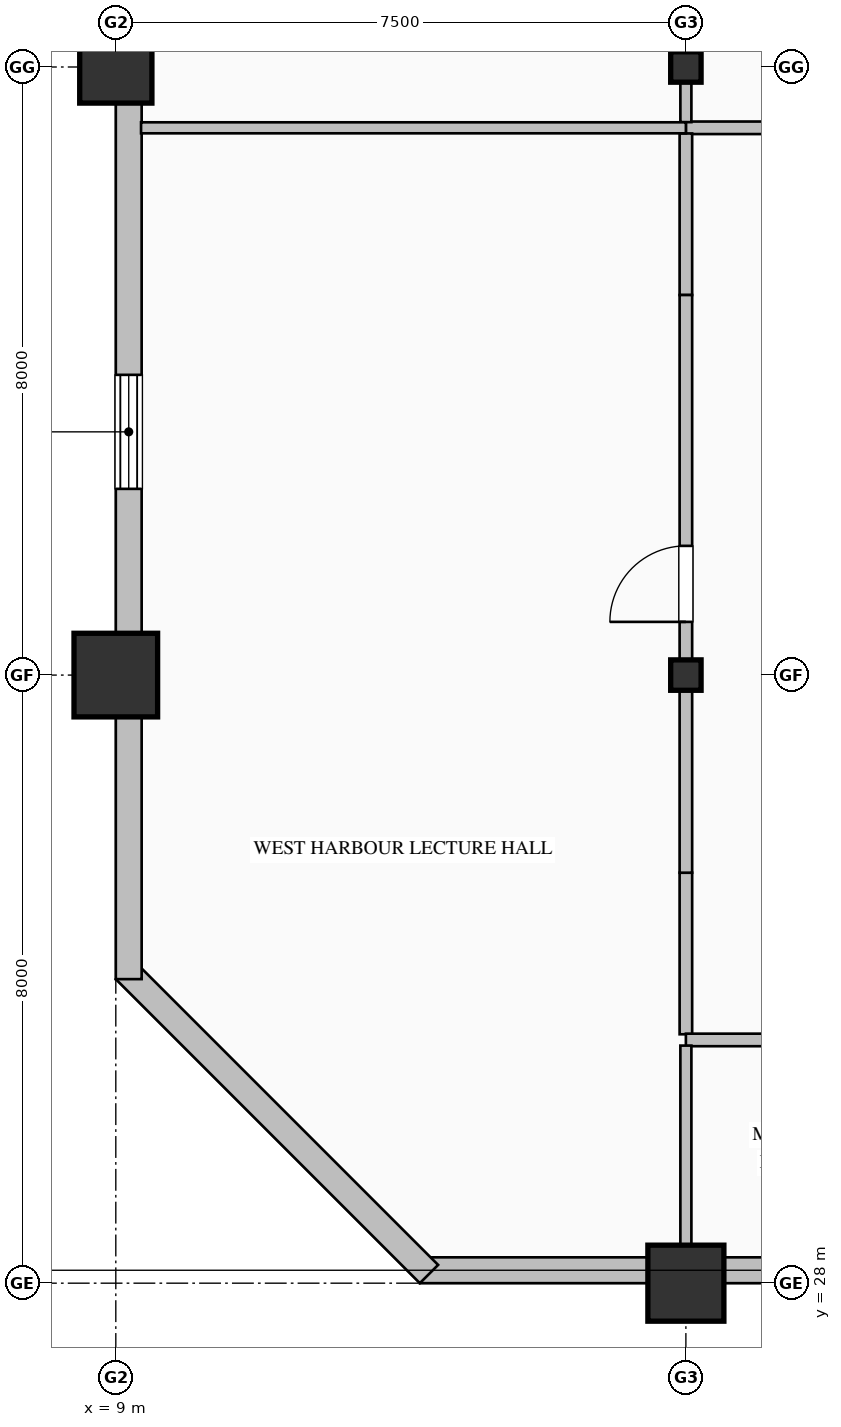
"""IFC4 building model, lengths in metres.
Left out: names, types, materials, properties, quantities, classifications, styles, units other than length and angle.
Written with IfcOpenShell. Run it as: python <this file> out.ifc"""

import sys

from ifc_helpers import new_model, si_unit, direction, frame, frame_2d, origin, origin_2d, place, context, subcontext, project, spatial, rectangle, hollow_rectangle, hollow_circle, i_section, extrude, element, fill, save


model = new_model("IFC4")
c1 = context("Model", 3, precision=1e-05, world=origin(), true_north=direction((0.0, 1.0)))
c2 = subcontext(c1, "Body", "Model", "MODEL_VIEW")
j1 = project(units=[si_unit("LENGTHUNIT", "METRE"), si_unit("PLANEANGLEUNIT", "RADIAN")], contexts=[c1])
p1 = place(None, origin())
s1 = spatial("IfcSite", under=j1, at=p1, CompositionType="ELEMENT")
p2 = place(p1, origin())
s2 = spatial("IfcBuilding", under=s1, at=p2, CompositionType="ELEMENT")
p3 = place(p2, frame((0.0, 0.0, 135.0)))
s3 = spatial("IfcBuildingStorey", under=s2, at=p3, CompositionType="ELEMENT", Elevation=135.0)
p4 = place(p3, frame((9.0, 36.0, 0.0), z_axis=(0.0, 0.0, 1.0), x_axis=(1.0, 0.0, 0.0)))
e1 = element("IfcColumn", 1, at=p4, inside=s3, PredefinedType="COLUMN", context=c2, shape_type="SweptSolid", body=[
    extrude(hollow_rectangle(XDim=1.1, YDim=1.1, WallThickness=0.04, at=origin_2d()), origin(), (0.0, 0.0, 1.0), 4.0),
])
p5 = place(p3, frame((9.0, 44.0, 0.0), z_axis=(0.0, 0.0, 1.0), x_axis=(1.0, 0.0, 0.0)))
e2 = element("IfcColumn", 2, at=p5, inside=s3, PredefinedType="COLUMN", context=c2, shape_type="SweptSolid", body=[
    extrude(hollow_rectangle(XDim=0.95, YDim=0.95, WallThickness=0.036, at=origin_2d()), origin(), (0.0, 0.0, 1.0), 4.0),
])
p6 = place(p3, frame((16.5, 28.0, 0.0), z_axis=(0.0, 0.0, 1.0), x_axis=(1.0, 0.0, 0.0)))
e3 = element("IfcColumn", 3, at=p6, inside=s3, PredefinedType="COLUMN", context=c2, shape_type="SweptSolid", body=[
    extrude(hollow_circle(Radius=0.5, WallThickness=0.036, at=origin_2d()), origin(), (0.0, 0.0, 1.0), 4.0),
])
for number, where, z_axis, x_axis in (
    (4, (16.5, 36.0, 0.0), (0.0, 0.0, 1.0), (1.0, 0.0, 0.0)),
    (5, (16.5, 44.0, 0.0), (0.0, 0.0, 1.0), (1.0, 0.0, 0.0)),
):
    element("IfcColumn", number, at=place(p3, frame(where, z_axis=z_axis, x_axis=x_axis)), inside=s3, PredefinedType="COLUMN", context=c2, shape_type="SweptSolid", body=[
        extrude(i_section(OverallWidth=0.4, OverallDepth=0.4, WebThickness=0.013, FlangeThickness=0.021, FilletRadius=0.022, at=origin_2d()), origin(), (0.0, 0.0, 1.0), 4.0),
    ])
p7 = place(p3, frame((40.52, 28.17, 0.0), z_axis=(0.0, 0.0, 1.0), x_axis=(-1.0, 0.0, 0.0)))
e6 = element("IfcWall", 6, at=p7, inside=s3, PredefinedType="SOLIDWALL", context=c2, shape_type="SweptSolid", body=[
    extrude(rectangle(XDim=27.52, YDim=0.34, at=frame_2d((13.76, 0.0))), origin(), (0.0, 0.0, 1.0), 3.165),
])
p8 = place(p7, frame((10.2, 0.0, 0.7)))
e7 = element("IfcOpeningElement", 7, at=p8, cuts=e6, PredefinedType="OPENING", context=c2, shape_type="SweptSolid", body=[
    extrude(rectangle(XDim=1.2, YDim=1.85, at=frame_2d((0.6, 0.925))), frame((0.0, 0.18, 0.0), z_axis=(0.0, -1.0, 0.0), x_axis=(1.0, 0.0, 0.0)), (0.0, 0.0, 1.0), 0.36),
])
p9 = place(p7, frame((17.175, 0.0, 0.85)))
e8 = element("IfcOpeningElement", 8, at=p9, cuts=e6, PredefinedType="OPENING", context=c2, shape_type="SweptSolid", body=[
    extrude(rectangle(XDim=1.65, YDim=1.95, at=frame_2d((0.825, 0.975))), frame((0.0, 0.18, 0.0), z_axis=(0.0, -1.0, 0.0), x_axis=(1.0, 0.0, 0.0)), (0.0, 0.0, 1.0), 0.36),
])
p10 = place(p7, frame((21.0, 0.0, 0.7)))
e9 = element("IfcOpeningElement", 9, at=p10, cuts=e6, PredefinedType="OPENING", context=c2, shape_type="SweptSolid", body=[
    extrude(rectangle(XDim=1.2, YDim=1.85, at=frame_2d((0.6, 0.925))), frame((0.0, 0.18, 0.0), z_axis=(0.0, -1.0, 0.0), x_axis=(1.0, 0.0, 0.0)), (0.0, 0.0, 1.0), 0.36),
])
p11 = place(p3, frame((13.12, 28.12, 0.0), z_axis=(0.0, 0.0, 1.0), x_axis=(-0.707106781187, 0.707106781187, 0.0)))
e10 = element("IfcWall", 10, at=p11, inside=s3, PredefinedType="SOLIDWALL", context=c2, shape_type="SweptSolid", body=[
    extrude(rectangle(XDim=5.657, YDim=0.34, at=frame_2d((2.828, 0.0))), origin(), (0.0, 0.0, 1.0), 3.765),
])
p12 = place(p3, frame((9.17, 32.0, 0.0), z_axis=(0.0, 0.0, 1.0), x_axis=(0.0, 1.0, 0.0)))
e11 = element("IfcWall", 11, at=p12, inside=s3, PredefinedType="SOLIDWALL", context=c2, shape_type="SweptSolid", body=[
    extrude(rectangle(XDim=16.0, YDim=0.34, at=frame_2d((8.0, 0.0))), origin(), (0.0, 0.0, 1.0), 3.265),
])
p13 = place(p12, frame((6.45, 0.0, 0.85)))
e12 = element("IfcOpeningElement", 12, at=p13, cuts=e11, PredefinedType="OPENING", context=c2, shape_type="SweptSolid", body=[
    extrude(rectangle(XDim=1.5, YDim=1.95, at=frame_2d((0.75, 0.975))), frame((0.0, 0.18, 0.0), z_axis=(0.0, -1.0, 0.0), x_axis=(1.0, 0.0, 0.0)), (0.0, 0.0, 1.0), 0.36),
])
p14 = place(p3, frame((16.5, 31.274, 0.0), z_axis=(0.0, 0.0, 1.0), x_axis=(0.0, 1.0, 0.0)))
e13 = element("IfcWall", 13, at=p14, inside=s3, PredefinedType="PARTITIONING", context=c2, shape_type="SweptSolid", body=[
    extrude(rectangle(XDim=2.125, YDim=0.165, at=frame_2d((1.063, 0.0))), origin(), (0.0, 0.0, 1.0), 3.157),
])
p15 = place(p3, frame((27.0, 31.2, 0.0), z_axis=(0.0, 0.0, 1.0), x_axis=(-1.0, 0.0, 0.0)))
e14 = element("IfcWall", 14, at=p15, inside=s3, PredefinedType="PARTITIONING", context=c2, shape_type="SweptSolid", body=[
    extrude(rectangle(XDim=10.5, YDim=0.165, at=frame_2d((5.25, 0.0))), origin(), (0.0, 0.0, 1.0), 3.765),
])
p16 = place(p15, frame((4.7, 0.0, 0.0)))
e15 = element("IfcOpeningElement", 15, at=p16, cuts=e14, PredefinedType="OPENING", context=c2, shape_type="SweptSolid", body=[
    extrude(rectangle(XDim=1.1, YDim=2.2, at=frame_2d((0.55, 1.1))), frame((0.0, 0.093, 0.0), z_axis=(0.0, -1.0, 0.0), x_axis=(1.0, 0.0, 0.0)), (0.0, 0.0, 1.0), 0.185),
])
p17 = place(p3, frame((16.5, 43.2, 0.0), z_axis=(0.0, 0.0, 1.0), x_axis=(1.0, 0.0, 0.0)))
e16 = element("IfcWall", 16, at=p17, inside=s3, PredefinedType="PARTITIONING", context=c2, shape_type="SweptSolid", body=[
    extrude(rectangle(XDim=8.0, YDim=0.165, at=frame_2d((4.0, 0.0))), origin(), (0.0, 0.0, 1.0), 3.765),
])
p18 = place(p17, frame((3.45, 0.0, 0.0)))
e17 = element("IfcOpeningElement", 17, at=p18, cuts=e16, PredefinedType="OPENING", context=c2, shape_type="SweptSolid", body=[
    extrude(rectangle(XDim=1.1, YDim=2.2, at=frame_2d((0.55, 1.1))), frame((0.0, 0.093, 0.0), z_axis=(0.0, -1.0, 0.0), x_axis=(1.0, 0.0, 0.0)), (0.0, 0.0, 1.0), 0.185),
])
p19 = place(p3, frame((16.5, 41.0, 0.0), z_axis=(0.0, 0.0, 1.0), x_axis=(0.0, 1.0, 0.0)))
e18 = element("IfcWall", 18, at=p19, inside=s3, PredefinedType="PARTITIONING", context=c2, shape_type="SweptSolid", body=[
    extrude(rectangle(XDim=2.125, YDim=0.165, at=frame_2d((1.063, 0.0))), origin(), (0.0, 0.0, 1.0), 3.157),
])
p20 = place(p3, frame((16.5, 33.4, 0.0), z_axis=(0.0, 0.0, 1.0), x_axis=(0.0, 1.0, 0.0)))
e19 = element("IfcWall", 19, at=p20, inside=s3, PredefinedType="PARTITIONING", context=c2, shape_type="SweptSolid", body=[
    extrude(rectangle(XDim=7.6, YDim=0.165, at=frame_2d((3.8, 0.0))), origin(), (0.0, 0.0, 1.0), 3.157),
])
p21 = place(p20, frame((3.3, 0.0, 0.0)))
e20 = element("IfcOpeningElement", 20, at=p21, cuts=e19, PredefinedType="OPENING", context=c2, shape_type="SweptSolid", body=[
    extrude(rectangle(XDim=1.0, YDim=2.15, at=frame_2d((0.5, 1.075))), frame((0.0, 0.093, 0.0), z_axis=(0.0, -1.0, 0.0), x_axis=(1.0, 0.0, 0.0)), (0.0, 0.0, 1.0), 0.185),
])
p22 = place(p3, frame((16.5, 51.668, 0.0), z_axis=(0.0, 0.0, 1.0), x_axis=(0.0, -1.0, 0.0)))
e21 = element("IfcWall", 21, at=p22, inside=s3, PredefinedType="PARTITIONING", context=c2, shape_type="SweptSolid", body=[
    extrude(rectangle(XDim=8.394, YDim=0.145, at=frame_2d((4.197, 0.0))), origin(), (0.0, 0.0, 1.0), 3.157),
])
p23 = place(p22, frame((3.647, 0.0, 0.0)))
e22 = element("IfcOpeningElement", 22, at=p23, cuts=e21, PredefinedType="OPENING", context=c2, shape_type="SweptSolid", body=[
    extrude(rectangle(XDim=1.1, YDim=2.2, at=frame_2d((0.55, 1.1))), frame((0.0, 0.083, 0.0), z_axis=(0.0, -1.0, 0.0), x_axis=(1.0, 0.0, 0.0)), (0.0, 0.0, 1.0), 0.165),
])
p24 = place(p3, frame((16.5, 43.2, 0.0), z_axis=(0.0, 0.0, 1.0), x_axis=(-1.0, 0.0, 0.0)))
e23 = element("IfcWall", 23, at=p24, inside=s3, PredefinedType="PARTITIONING", context=c2, shape_type="SweptSolid", body=[
    extrude(rectangle(XDim=7.168, YDim=0.145, at=frame_2d((3.584, 0.0))), origin(), (0.0, 0.0, 1.0), 3.765),
])
p25 = place(p3, frame((16.5, 31.125, 0.0), z_axis=(0.0, 0.0, 1.0), x_axis=(0.0, -1.0, 0.0)))
e24 = element("IfcWall", 24, at=p25, inside=s3, PredefinedType="PARTITIONING", context=c2, shape_type="SweptSolid", body=[
    extrude(rectangle(XDim=2.793, YDim=0.145, at=frame_2d((1.397, 0.0))), origin(), (0.0, 0.0, 1.0), 3.157),
])
p26 = place(p13, origin())
e25 = element("IfcWindow", 25, at=p26, inside=s3, PartitioningType="DOUBLE_PANEL_VERTICAL", PredefinedType="WINDOW", context=c2, shape_type="SweptSolid", body=[
    extrude(rectangle(XDim=1.5, YDim=1.95, at=frame_2d((0.75, 0.975))), frame((0.0, 0.15, 0.0), z_axis=(0.0, -1.0, 0.0), x_axis=(1.0, 0.0, 0.0)), (0.0, 0.0, 1.0), 0.06),
])
fill(e12, e25)
p27 = place(p21, origin())
e26 = element("IfcDoor", 26, at=p27, inside=s3, OperationType="SINGLE_SWING_LEFT", PredefinedType="DOOR", context=c2, shape_type="SweptSolid", body=[
    extrude(rectangle(XDim=1.0, YDim=2.15, at=frame_2d((0.5, 1.075))), frame((0.0, 0.025, 0.0), z_axis=(0.0, -1.0, 0.0), x_axis=(1.0, 0.0, 0.0)), (0.0, 0.0, 1.0), 0.05),
])
fill(e20, e26)
save(model, sys.argv[1])
